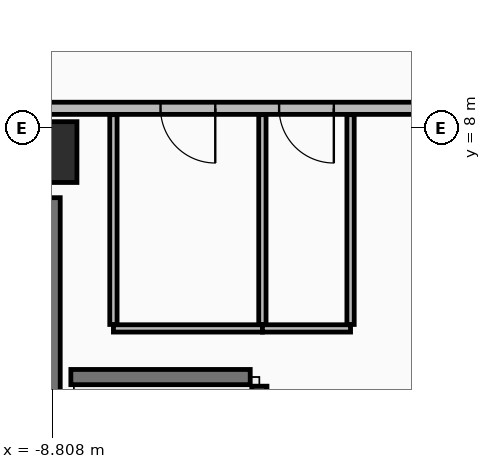
"""IFC4 building model, lengths in metres.
Left out: names, types, materials, properties, quantities, classifications, styles, units other than length and angle.
Written with IfcOpenShell. Run it as: python <this file> out.ifc"""

import sys

from ifc_helpers import new_model, si_unit, direction, frame, frame_2d, origin, origin_2d, place, context, subcontext, project, spatial, rectangle, extrude, element, fill, save


model = new_model("IFC4")
c1 = context("Model", 3, precision=1e-05, world=origin(), true_north=direction((0.0, 1.0)))
c2 = subcontext(c1, "Body", "Model", "MODEL_VIEW")
j1 = project(units=[si_unit("LENGTHUNIT", "METRE"), si_unit("PLANEANGLEUNIT", "RADIAN")], contexts=[c1])
p1 = place(None, origin())
s1 = spatial("IfcSite", under=j1, at=p1, CompositionType="ELEMENT")
p2 = place(p1, origin())
s2 = spatial("IfcBuilding", under=s1, at=p2, CompositionType="ELEMENT")
p3 = place(p2, frame((0.0, 0.0, 298.0)))
s3 = spatial("IfcBuildingStorey", under=s2, at=p3, CompositionType="ELEMENT", Elevation=298.0)
p4 = place(p3, frame((-8.9, 7.6, 0.0), z_axis=(0.0, 0.0, 1.0), x_axis=(1.0, 0.0, 0.0)))
e1 = element("IfcColumn", 1, at=p4, inside=s3, PredefinedType="COLUMN", context=c2, shape_type="SweptSolid", body=[
    extrude(rectangle(XDim=1.0, YDim=1.0, at=origin_2d()), origin(), (0.0, 0.0, 1.0), 4.15),
])
p5 = place(p3, frame((-8.9, -3.85, 0.0), z_axis=(0.0, 0.0, 1.0), x_axis=(0.0, 1.0, 0.0)))
e2 = element("IfcWall", 2, at=p5, inside=s3, PredefinedType="SHEAR", context=c2, shape_type="SweptSolid", body=[
    extrude(rectangle(XDim=10.7, YDim=0.45, at=frame_2d((5.35, 0.0))), origin(), (0.0, 0.0, 1.0), 3.95),
])
p6 = place(p3, frame((9.62, 8.32, 0.0), z_axis=(0.0, 0.0, 1.0), x_axis=(-1.0, 0.0, 0.0)))
e3 = element("IfcWall", 3, at=p6, inside=s3, PredefinedType="PARTITIONING", context=c2, shape_type="SweptSolid", body=[
    extrude(rectangle(XDim=19.24, YDim=0.2, at=frame_2d((9.62, 0.0))), origin(), (0.0, 0.0, 1.0), 3.445),
])
p7 = place(p6, frame((8.67, 0.0, 0.0)))
e4 = element("IfcOpeningElement", 4, at=p7, cuts=e3, PredefinedType="OPENING", context=c2, shape_type="SweptSolid", body=[
    extrude(rectangle(XDim=0.9, YDim=2.1, at=frame_2d((0.45, 1.05))), frame((0.0, 0.11, 0.0), z_axis=(0.0, -1.0, 0.0), x_axis=(1.0, 0.0, 0.0)), (0.0, 0.0, 1.0), 0.22),
])
p8 = place(p6, frame((15.745, 0.0, 0.0)))
e5 = element("IfcOpeningElement", 5, at=p8, cuts=e3, PredefinedType="OPENING", context=c2, shape_type="SweptSolid", body=[
    extrude(rectangle(XDim=0.9, YDim=2.1, at=frame_2d((0.45, 1.05))), frame((0.0, 0.11, 0.0), z_axis=(0.0, -1.0, 0.0), x_axis=(1.0, 0.0, 0.0)), (0.0, 0.0, 1.0), 0.22),
])
p9 = place(p6, frame((13.795, 0.0, 0.0)))
e6 = element("IfcOpeningElement", 6, at=p9, cuts=e3, PredefinedType="OPENING", context=c2, shape_type="SweptSolid", body=[
    extrude(rectangle(XDim=0.9, YDim=2.1, at=frame_2d((0.45, 1.05))), frame((0.0, 0.11, 0.0), z_axis=(0.0, -1.0, 0.0), x_axis=(1.0, 0.0, 0.0)), (0.0, 0.0, 1.0), 0.22),
])
p10 = place(p3, frame((-5.4, -3.55, 0.0), z_axis=(0.0, 0.0, 1.0), x_axis=(0.0, 1.0, 0.0)))
e7 = element("IfcWall", 7, at=p10, inside=s3, PredefinedType="SHEAR", context=c2, shape_type="SweptSolid", body=[
    extrude(rectangle(XDim=7.3, YDim=0.25, at=frame_2d((3.65, 0.0))), origin(), (0.0, 0.0, 1.0), 3.95),
])
p11 = place(p3, frame((-8.5, 3.9, 0.0), z_axis=(0.0, 0.0, 1.0), x_axis=(1.0, 0.0, 0.0)))
e8 = element("IfcWall", 8, at=p11, inside=s3, PredefinedType="SHEAR", context=c2, shape_type="SweptSolid", body=[
    extrude(rectangle(XDim=2.95, YDim=0.25, at=frame_2d((1.475, 0.0))), origin(), (0.0, 0.0, 1.0), 3.95),
])
p12 = place(p3, frame((-7.8, 4.7, 0.0), z_axis=(0.0, 0.0, 1.0), x_axis=(1.0, 0.0, 0.0)))
e9 = element("IfcWall", 9, at=p12, inside=s3, PredefinedType="PARTITIONING", context=c2, shape_type="SweptSolid", body=[
    extrude(rectangle(XDim=2.45, YDim=0.12, at=frame_2d((1.225, 0.0))), origin(), (0.0, 0.0, 1.0), 3.95),
])
for number, where, z_axis, x_axis in (
    (10, (-5.35, 4.765, 0.0), (0.0, 0.0, 1.0), (0.0, 1.0, 0.0)),
    (11, (-7.8, 8.215, 0.0), (0.0, 0.0, 1.0), (0.0, -1.0, 0.0)),
):
    element("IfcWall", number, at=place(p3, frame(where, z_axis=z_axis, x_axis=x_axis)), inside=s3, PredefinedType="PARTITIONING", context=c2, shape_type="SweptSolid", body=[
        extrude(rectangle(XDim=3.45, YDim=0.12, at=frame_2d((1.725, 0.0))), origin(), (0.0, 0.0, 1.0), 3.245),
    ])
p13 = place(p3, frame((-5.35, 4.7, 0.0), z_axis=(0.0, 0.0, 1.0), x_axis=(1.0, 0.0, 0.0)))
e12 = element("IfcWall", 12, at=p13, inside=s3, PredefinedType="PARTITIONING", context=c2, shape_type="SweptSolid", body=[
    extrude(rectangle(XDim=1.45, YDim=0.12, at=frame_2d((0.725, 0.0))), origin(), (0.0, 0.0, 1.0), 3.95),
])
p14 = place(p3, frame((-3.9, 4.765, 0.0), z_axis=(0.0, 0.0, 1.0), x_axis=(0.0, 1.0, 0.0)))
e13 = element("IfcWall", 13, at=p14, inside=s3, PredefinedType="PARTITIONING", context=c2, shape_type="SweptSolid", body=[
    extrude(rectangle(XDim=3.45, YDim=0.12, at=frame_2d((1.725, 0.0))), origin(), (0.0, 0.0, 1.0), 3.245),
])
p15 = place(p8, origin())
e14 = element("IfcDoor", 14, at=p15, inside=s3, OperationType="SINGLE_SWING_LEFT", PredefinedType="DOOR", context=c2, shape_type="SweptSolid", body=[
    extrude(rectangle(XDim=0.9, YDim=2.1, at=frame_2d((0.45, 1.05))), frame((0.0, 0.025, 0.0), z_axis=(0.0, -1.0, 0.0), x_axis=(1.0, 0.0, 0.0)), (0.0, 0.0, 1.0), 0.05),
])
fill(e5, e14)
p16 = place(p9, origin())
e15 = element("IfcDoor", 15, at=p16, inside=s3, OperationType="SINGLE_SWING_LEFT", PredefinedType="DOOR", context=c2, shape_type="SweptSolid", body=[
    extrude(rectangle(XDim=0.9, YDim=2.1, at=frame_2d((0.45, 1.05))), frame((0.0, 0.025, 0.0), z_axis=(0.0, -1.0, 0.0), x_axis=(1.0, 0.0, 0.0)), (0.0, 0.0, 1.0), 0.05),
])
fill(e6, e15)
save(model, sys.argv[1])
